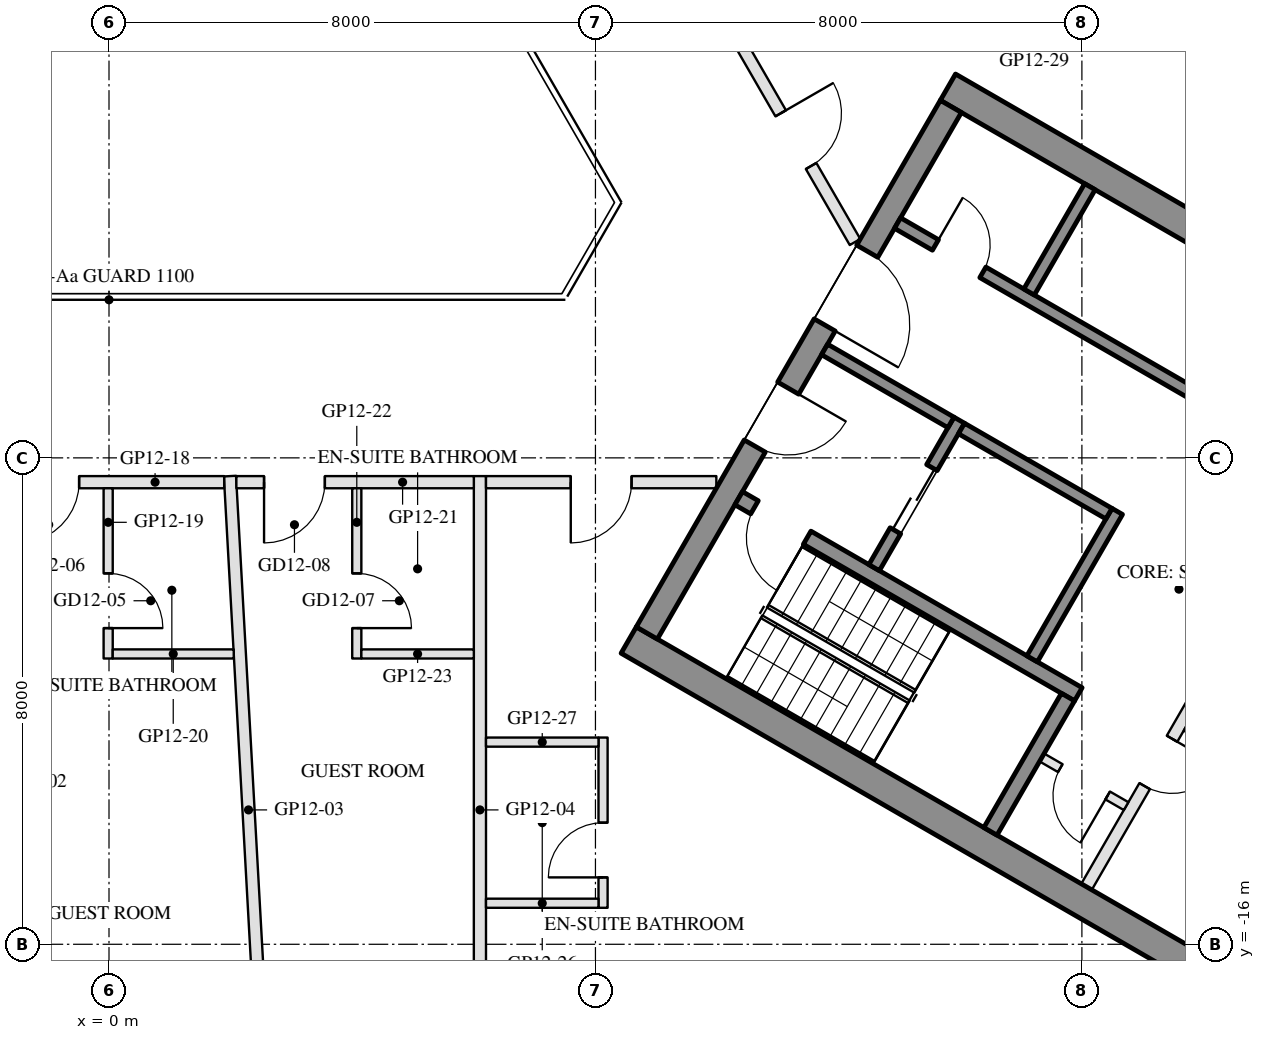
"""IFC4 building model, lengths in metres.
Left out: names, types, materials, properties, quantities, classifications, styles, units other than length and angle.
Written with IfcOpenShell. Run it as: python <this file> out.ifc"""

import sys

from ifc_helpers import new_model, si_unit, direction, frame, frame_2d, origin, place, context, subcontext, project, spatial, rectangle, extrude, element, fill, save


model = new_model("IFC4")
c1 = context("Model", 3, precision=1e-05, world=origin(), true_north=direction((0.0, 1.0)))
c2 = subcontext(c1, "Body", "Model", "MODEL_VIEW")
j1 = project(units=[si_unit("LENGTHUNIT", "METRE"), si_unit("PLANEANGLEUNIT", "RADIAN")], contexts=[c1])
p1 = place(None, origin())
s1 = spatial("IfcSite", under=j1, at=p1, CompositionType="ELEMENT")
p2 = place(p1, origin())
s2 = spatial("IfcBuilding", under=s1, at=p2, CompositionType="ELEMENT")
p3 = place(p2, frame((0.0, 0.0, 146.6)))
s3 = spatial("IfcBuildingStorey", under=s2, at=p3, CompositionType="ELEMENT", Elevation=146.6)
for number, where, z_axis, x_axis in (
    (1, (8.547, -10.997, 0.0), (0.0, 0.0, 1.0), (0.866, -0.5, 0.0)),
    (2, (13.797, -1.903, 0.0), (0.0, 0.0, 1.0), (0.866, -0.5, 0.0)),
):
    element("IfcWall", number, at=place(p3, frame(where, z_axis=z_axis, x_axis=x_axis)), inside=s3, PredefinedType="SHEAR", context=c2, shape_type="SweptSolid", body=[
        extrude(rectangle(XDim=14.837, YDim=0.5, at=frame_2d((7.418, 0.0))), origin(), (0.0, 0.0, 1.0), 3.5),
    ])
p4 = place(p3, frame((8.845, -10.88, 0.0), z_axis=(0.0, 0.0, 1.0), x_axis=(0.500004234368, 0.866022959057, 0.0)))
e3 = element("IfcWall", 3, at=p4, inside=s3, PredefinedType="SHEAR", context=c2, shape_type="SweptSolid", body=[
    extrude(rectangle(XDim=10.0, YDim=0.4, at=frame_2d((5.0, 0.0))), origin(), (0.0, 0.0, 1.0), 3.5),
])
p5 = place(p4, frame((3.55, 0.0, 0.0)))
e4 = element("IfcOpeningElement", 4, at=p5, cuts=e3, PredefinedType="OPENING", context=c2, shape_type="SweptSolid", body=[
    extrude(rectangle(XDim=1.1, YDim=2.1, at=frame_2d((0.55, 1.05))), frame((0.0, 0.21, 0.0), z_axis=(0.0, -1.0, 0.0), x_axis=(1.0, 0.0, 0.0)), (0.0, 0.0, 1.0), 0.42),
])
p6 = place(p4, frame((5.85, 0.0, 0.0)))
e5 = element("IfcOpeningElement", 5, at=p6, cuts=e3, PredefinedType="OPENING", context=c2, shape_type="SweptSolid", body=[
    extrude(rectangle(XDim=1.4, YDim=2.1, at=frame_2d((0.7, 1.05))), frame((0.0, 0.21, 0.0), z_axis=(0.0, -1.0, 0.0), x_axis=(1.0, 0.0, 0.0)), (0.0, 0.0, 1.0), 0.42),
])
p7 = place(p3, frame((10.356, -8.664, 0.0), z_axis=(0.0, 0.0, 1.0), x_axis=(0.866028629588, -0.499994412703, 0.0)))
e6 = element("IfcWall", 6, at=p7, inside=s3, PredefinedType="SHEAR", context=c2, shape_type="SweptSolid", body=[
    extrude(rectangle(XDim=6.45, YDim=0.25, at=frame_2d((3.225, 0.0))), origin(), (0.0, 0.0, 1.0), 3.5),
])
p8 = place(p7, frame((0.3, 0.0, 0.0)))
e7 = element("IfcOpeningElement", 7, at=p8, cuts=e6, PredefinedType="OPENING", context=c2, shape_type="SweptSolid", body=[
    extrude(rectangle(XDim=1.0, YDim=2.1, at=frame_2d((0.5, 1.05))), frame((0.0, 0.135, 0.0), z_axis=(0.0, -1.0, 0.0), x_axis=(1.0, 0.0, 0.0)), (0.0, 0.0, 1.0), 0.27),
])
p9 = place(p3, frame((14.496, -14.143, 0.0), z_axis=(0.0, 0.0, 1.0), x_axis=(0.500062241894, 0.865989465428, 0.0)))
e8 = element("IfcWall", 8, at=p9, inside=s3, PredefinedType="SHEAR", context=c2, shape_type="SweptSolid", body=[
    extrude(rectangle(XDim=2.55, YDim=0.25, at=frame_2d((1.275, 0.0))), origin(), (0.0, 0.0, 1.0), 3.5),
])
p10 = place(p3, frame((15.181, -11.305, 0.0), z_axis=(0.0, 0.0, 1.0), x_axis=(0.49994636267, 0.866056369097, 0.0)))
e9 = element("IfcWall", 9, at=p10, inside=s3, PredefinedType="SHEAR", context=c2, shape_type="SweptSolid", body=[
    extrude(rectangle(XDim=2.8, YDim=0.2, at=frame_2d((1.4, 0.0))), origin(), (0.0, 0.0, 1.0), 3.5),
])
p11 = place(p3, frame((12.583, -9.805, 0.0), z_axis=(0.0, 0.0, 1.0), x_axis=(0.49994636267, 0.866056369097, 0.0)))
e10 = element("IfcWall", 10, at=p11, inside=s3, PredefinedType="SHEAR", context=c2, shape_type="SweptSolid", body=[
    extrude(rectangle(XDim=2.8, YDim=0.2, at=frame_2d((1.4, 0.0))), origin(), (0.0, 0.0, 1.0), 3.5),
])
p12 = place(p11, frame((0.7, 0.0, 0.0)))
e11 = element("IfcOpeningElement", 11, at=p12, cuts=e10, PredefinedType="OPENING", context=c2, shape_type="SweptSolid", body=[
    extrude(rectangle(XDim=1.2, YDim=2.1, at=frame_2d((0.6, 1.05))), frame((0.0, 0.11, 0.0), z_axis=(0.0, -1.0, 0.0), x_axis=(1.0, 0.0, 0.0)), (0.0, 0.0, 1.0), 0.22),
])
p13 = place(p3, frame((11.768, -6.217, 0.0), z_axis=(0.0, 0.0, 1.0), x_axis=(0.866050077142, -0.499957262057, 0.0)))
e12 = element("IfcWall", 12, at=p13, inside=s3, PredefinedType="SHEAR", context=c2, shape_type="SweptSolid", body=[
    extrude(rectangle(XDim=2.4, YDim=0.2, at=frame_2d((1.2, 0.0))), origin(), (0.0, 0.0, 1.0), 3.5),
])
p14 = place(p3, frame((14.02, -7.517, 0.0), z_axis=(0.0, 0.0, 1.0), x_axis=(0.866034573852, -0.49998411664, 0.0)))
e13 = element("IfcWall", 13, at=p14, inside=s3, PredefinedType="SHEAR", context=c2, shape_type="SweptSolid", body=[
    extrude(rectangle(XDim=2.8, YDim=0.2, at=frame_2d((1.4, 0.0))), origin(), (0.0, 0.0, 1.0), 3.5),
])
p15 = place(p3, frame((12.968, -4.138, 0.0), z_axis=(0.0, 0.0, 1.0), x_axis=(0.866028328073, -0.49999493495, 0.0)))
e14 = element("IfcWall", 14, at=p15, inside=s3, PredefinedType="SHEAR", context=c2, shape_type="SweptSolid", body=[
    extrude(rectangle(XDim=10.16, YDim=0.2, at=frame_2d((5.08, 0.0))), origin(), (0.0, 0.0, 1.0), 3.5),
])
p16 = place(p15, frame((0.72, 0.0, 0.0)))
e15 = element("IfcOpeningElement", 15, at=p16, cuts=e14, PredefinedType="OPENING", context=c2, shape_type="SweptSolid", body=[
    extrude(rectangle(XDim=0.9, YDim=2.1, at=frame_2d((0.45, 1.05))), frame((0.0, 0.11, 0.0), z_axis=(0.0, -1.0, 0.0), x_axis=(1.0, 0.0, 0.0)), (0.0, 0.0, 1.0), 0.22),
])
p17 = place(p15, frame((5.8, 0.0, 0.0)))
e16 = element("IfcOpeningElement", 16, at=p17, cuts=e14, PredefinedType="OPENING", context=c2, shape_type="SweptSolid", body=[
    extrude(rectangle(XDim=0.9, YDim=2.1, at=frame_2d((0.45, 1.05))), frame((0.0, 0.11, 0.0), z_axis=(0.0, -1.0, 0.0), x_axis=(1.0, 0.0, 0.0)), (0.0, 0.0, 1.0), 0.22),
])
p18 = place(p3, frame((15.131, -5.272, 0.0), z_axis=(0.0, 0.0, 1.0), x_axis=(0.499972520799, 0.866041268327, 0.0)))
e17 = element("IfcWall", 17, at=p18, inside=s3, PredefinedType="SHEAR", context=c2, shape_type="SweptSolid", body=[
    extrude(rectangle(XDim=2.0, YDim=0.2, at=frame_2d((1.0, 0.0))), origin(), (0.0, 0.0, 1.0), 3.5),
])
p19 = place(p3, frame((16.076, -15.055, 0.0), z_axis=(0.0, 0.0, 1.0), x_axis=(0.499995103361, 0.866028230842, 0.0)))
e18 = element("IfcWall", 18, at=p19, inside=s3, PredefinedType="PARTITIONING", context=c2, shape_type="SweptSolid", body=[
    extrude(rectangle(XDim=5.4, YDim=0.2, at=frame_2d((2.7, 0.0))), origin(), (0.0, 0.0, 1.0), 3.5),
])
p20 = place(p19, frame((1.913, 0.0, 0.0)))
e19 = element("IfcOpeningElement", 19, at=p20, cuts=e18, PredefinedType="OPENING", context=c2, shape_type="SweptSolid", body=[
    extrude(rectangle(XDim=0.9, YDim=2.1, at=frame_2d((0.45, 1.05))), frame((0.0, 0.11, 0.0), z_axis=(0.0, -1.0, 0.0), x_axis=(1.0, 0.0, 0.0)), (0.0, 0.0, 1.0), 0.22),
])
p21 = place(p19, frame((3.788, 0.0, 0.0)))
e20 = element("IfcOpeningElement", 20, at=p21, cuts=e18, PredefinedType="OPENING", context=c2, shape_type="SweptSolid", body=[
    extrude(rectangle(XDim=0.9, YDim=2.1, at=frame_2d((0.45, 1.05))), frame((0.0, 0.11, 0.0), z_axis=(0.0, -1.0, 0.0), x_axis=(1.0, 0.0, 0.0)), (0.0, 0.0, 1.0), 0.22),
])
p22 = place(p3, frame((15.342, -12.928, 0.0), z_axis=(0.0, 0.0, 1.0), x_axis=(0.865989903783, -0.500061482766, 0.0)))
e21 = element("IfcWall", 21, at=p22, inside=s3, PredefinedType="PARTITIONING", context=c2, shape_type="SweptSolid", body=[
    extrude(rectangle(XDim=1.6, YDim=0.15, at=frame_2d((0.8, 0.0))), origin(), (0.0, 0.0, 1.0), 3.5),
])
p23 = place(p22, frame((0.35, 0.0, 0.0)))
e22 = element("IfcOpeningElement", 22, at=p23, cuts=e21, PredefinedType="OPENING", context=c2, shape_type="SweptSolid", body=[
    extrude(rectangle(XDim=0.9, YDim=2.1, at=frame_2d((0.45, 1.05))), frame((0.0, 0.085, 0.0), z_axis=(0.0, -1.0, 0.0), x_axis=(1.0, 0.0, 0.0)), (0.0, 0.0, 1.0), 0.17),
])
p24 = place(p3, frame((17.713, -12.42, 0.0), z_axis=(0.0, 0.0, 1.0), x_axis=(0.866016523273, -0.500015381182, 0.0)))
e23 = element("IfcWall", 23, at=p24, inside=s3, PredefinedType="PARTITIONING", context=c2, shape_type="SweptSolid", body=[
    extrude(rectangle(XDim=6.95, YDim=0.15, at=frame_2d((3.475, 0.0))), origin(), (0.0, 0.0, 1.0), 3.5),
])
p25 = place(p3, frame((2.6, -19.28, 0.0), z_axis=(0.0, 0.0, 1.0), x_axis=(-0.055568385591, 0.998454883569, 0.0)))
e24 = element("IfcWall", 24, at=p25, inside=s3, PredefinedType="PARTITIONING", context=c2, shape_type="SweptSolid", body=[
    extrude(rectangle(XDim=10.997, YDim=0.2, at=frame_2d((5.499, 0.0))), origin(), (0.0, 0.0, 1.0), 3.06),
])
p26 = place(p3, frame((6.1, -19.28, 0.0), z_axis=(0.0, 0.0, 1.0), x_axis=(0.0, 1.0, 0.0)))
e25 = element("IfcWall", 25, at=p26, inside=s3, PredefinedType="PARTITIONING", context=c2, shape_type="SweptSolid", body=[
    extrude(rectangle(XDim=10.98, YDim=0.2, at=frame_2d((5.49, 0.0))), origin(), (0.0, 0.0, 1.0), 3.06),
])
p27 = place(p3, frame((1.894, -8.4, 0.0), z_axis=(0.0, 0.0, 1.0), x_axis=(-1.0, 0.0, 0.0)))
e26 = element("IfcWall", 26, at=p27, inside=s3, PredefinedType="PARTITIONING", context=c2, shape_type="SweptSolid", body=[
    extrude(rectangle(XDim=3.789, YDim=0.2, at=frame_2d((1.894, 0.0))), origin(), (0.0, 0.0, 1.0), 2.95),
])
p28 = place(p27, frame((2.386, 0.0, 0.0)))
e27 = element("IfcOpeningElement", 27, at=p28, cuts=e26, PredefinedType="OPENING", context=c2, shape_type="SweptSolid", body=[
    extrude(rectangle(XDim=1.0, YDim=2.1, at=frame_2d((0.5, 1.05))), frame((0.0, 0.11, 0.0), z_axis=(0.0, -1.0, 0.0), x_axis=(1.0, 0.0, 0.0)), (0.0, 0.0, 1.0), 0.22),
])
p29 = place(p3, frame((-0.014, -8.5, 0.0), z_axis=(0.0, 0.0, 1.0), x_axis=(0.0, -1.0, 0.0)))
e28 = element("IfcWall", 28, at=p29, inside=s3, PredefinedType="PARTITIONING", context=c2, shape_type="SweptSolid", body=[
    extrude(rectangle(XDim=2.8, YDim=0.15, at=frame_2d((1.4, 0.0))), origin(), (0.0, 0.0, 1.0), 2.95),
])
p30 = place(p29, frame((1.4, 0.0, 0.0)))
e29 = element("IfcOpeningElement", 29, at=p30, cuts=e28, PredefinedType="OPENING", context=c2, shape_type="SweptSolid", body=[
    extrude(rectangle(XDim=0.9, YDim=2.1, at=frame_2d((0.45, 1.05))), frame((0.0, 0.085, 0.0), z_axis=(0.0, -1.0, 0.0), x_axis=(1.0, 0.0, 0.0)), (0.0, 0.0, 1.0), 0.17),
])
p31 = place(p3, frame((0.061, -11.225, 0.0), z_axis=(0.0, 0.0, 1.0), x_axis=(1.0, 0.0, 0.0)))
e30 = element("IfcWall", 30, at=p31, inside=s3, PredefinedType="PARTITIONING", context=c2, shape_type="SweptSolid", body=[
    extrude(rectangle(XDim=1.99, YDim=0.15, at=frame_2d((0.995, 0.0))), origin(), (0.0, 0.0, 1.0), 2.95),
])
p32 = place(p3, frame((6.0, -8.4, 0.0), z_axis=(0.0, 0.0, 1.0), x_axis=(-1.0, 0.0, 0.0)))
e31 = element("IfcWall", 31, at=p32, inside=s3, PredefinedType="PARTITIONING", context=c2, shape_type="SweptSolid", body=[
    extrude(rectangle(XDim=3.906, YDim=0.2, at=frame_2d((1.953, 0.0))), origin(), (0.0, 0.0, 1.0), 2.95),
])
p33 = place(p32, frame((2.45, 0.0, 0.0)))
e32 = element("IfcOpeningElement", 32, at=p33, cuts=e31, PredefinedType="OPENING", context=c2, shape_type="SweptSolid", body=[
    extrude(rectangle(XDim=1.0, YDim=2.1, at=frame_2d((0.5, 1.05))), frame((0.0, 0.11, 0.0), z_axis=(0.0, -1.0, 0.0), x_axis=(1.0, 0.0, 0.0)), (0.0, 0.0, 1.0), 0.22),
])
p34 = place(p3, frame((4.075, -8.5, 0.0), z_axis=(0.0, 0.0, 1.0), x_axis=(0.0, -1.0, 0.0)))
e33 = element("IfcWall", 33, at=p34, inside=s3, PredefinedType="PARTITIONING", context=c2, shape_type="SweptSolid", body=[
    extrude(rectangle(XDim=2.8, YDim=0.15, at=frame_2d((1.4, 0.0))), origin(), (0.0, 0.0, 1.0), 2.95),
])
p35 = place(p34, frame((1.4, 0.0, 0.0)))
e34 = element("IfcOpeningElement", 34, at=p35, cuts=e33, PredefinedType="OPENING", context=c2, shape_type="SweptSolid", body=[
    extrude(rectangle(XDim=0.9, YDim=2.1, at=frame_2d((0.45, 1.05))), frame((0.0, 0.085, 0.0), z_axis=(0.0, -1.0, 0.0), x_axis=(1.0, 0.0, 0.0)), (0.0, 0.0, 1.0), 0.17),
])
p36 = place(p3, frame((4.15, -11.225, 0.0), z_axis=(0.0, 0.0, 1.0), x_axis=(1.0, 0.0, 0.0)))
e35 = element("IfcWall", 35, at=p36, inside=s3, PredefinedType="PARTITIONING", context=c2, shape_type="SweptSolid", body=[
    extrude(rectangle(XDim=1.85, YDim=0.15, at=frame_2d((0.925, 0.0))), origin(), (0.0, 0.0, 1.0), 3.55),
])
p37 = place(p3, frame((9.988, -8.4, 0.0), z_axis=(0.0, 0.0, 1.0), x_axis=(-1.0, 0.0, 0.0)))
e36 = element("IfcWall", 36, at=p37, inside=s3, PredefinedType="PARTITIONING", context=c2, shape_type="SweptSolid", body=[
    extrude(rectangle(XDim=3.788, YDim=0.2, at=frame_2d((1.894, 0.0))), origin(), (0.0, 0.0, 1.0), 2.95),
])
p38 = place(p37, frame((1.394, 0.0, 0.0)))
e37 = element("IfcOpeningElement", 37, at=p38, cuts=e36, PredefinedType="OPENING", context=c2, shape_type="SweptSolid", body=[
    extrude(rectangle(XDim=1.0, YDim=2.1, at=frame_2d((0.5, 1.05))), frame((0.0, 0.11, 0.0), z_axis=(0.0, -1.0, 0.0), x_axis=(1.0, 0.0, 0.0)), (0.0, 0.0, 1.0), 0.22),
])
p39 = place(p3, frame((8.125, -15.4, 0.0), z_axis=(0.0, 0.0, 1.0), x_axis=(0.0, 1.0, 0.0)))
e38 = element("IfcWall", 38, at=p39, inside=s3, PredefinedType="PARTITIONING", context=c2, shape_type="SweptSolid", body=[
    extrude(rectangle(XDim=2.8, YDim=0.15, at=frame_2d((1.4, 0.0))), origin(), (0.0, 0.0, 1.0), 3.55),
])
p40 = place(p39, frame((0.5, 0.0, 0.0)))
e39 = element("IfcOpeningElement", 39, at=p40, cuts=e38, PredefinedType="OPENING", context=c2, shape_type="SweptSolid", body=[
    extrude(rectangle(XDim=0.9, YDim=2.1, at=frame_2d((0.45, 1.05))), frame((0.0, 0.085, 0.0), z_axis=(0.0, -1.0, 0.0), x_axis=(1.0, 0.0, 0.0)), (0.0, 0.0, 1.0), 0.17),
])
for number, where, z_axis, x_axis in (
    (40, (6.2, -15.325, 0.0), (0.0, 0.0, 1.0), (1.0, 0.0, 0.0)),
    (41, (6.2, -12.675, 0.0), (0.0, 0.0, 1.0), (1.0, 0.0, 0.0)),
):
    element("IfcWall", number, at=place(p3, frame(where, z_axis=z_axis, x_axis=x_axis)), inside=s3, PredefinedType="PARTITIONING", context=c2, shape_type="SweptSolid", body=[
        extrude(rectangle(XDim=1.85, YDim=0.15, at=frame_2d((0.925, 0.0))), origin(), (0.0, 0.0, 1.0), 2.95),
    ])
p41 = place(p3, frame((10.325, -1.083, 0.0), z_axis=(0.0, 0.0, 1.0), x_axis=(0.500008716408, -0.866020371305, 0.0)))
e42 = element("IfcWall", 42, at=p41, inside=s3, PredefinedType="PARTITIONING", context=c2, shape_type="SweptSolid", body=[
    extrude(rectangle(XDim=3.888, YDim=0.2, at=frame_2d((1.944, 0.0))), origin(), (0.0, 0.0, 1.0), 2.95),
])
p42 = place(p41, frame((1.444, 0.0, 0.0)))
e43 = element("IfcOpeningElement", 43, at=p42, cuts=e42, PredefinedType="OPENING", context=c2, shape_type="SweptSolid", body=[
    extrude(rectangle(XDim=1.0, YDim=2.1, at=frame_2d((0.5, 1.05))), frame((0.0, 0.11, 0.0), z_axis=(0.0, -1.0, 0.0), x_axis=(1.0, 0.0, 0.0)), (0.0, 0.0, 1.0), 0.22),
])
p43 = place(p12, origin())
e44 = element("IfcDoor", 44, at=p43, inside=s3, OperationType="DOUBLE_DOOR_SLIDING", PredefinedType="DOOR", context=c2, shape_type="SweptSolid", body=[
    extrude(rectangle(XDim=1.2, YDim=2.1, at=frame_2d((0.6, 1.05))), frame((0.0, 0.025, 0.0), z_axis=(0.0, -1.0, 0.0), x_axis=(1.0, 0.0, 0.0)), (0.0, 0.0, 1.0), 0.05),
])
fill(e11, e44)
p44 = place(p23, frame((0.9, 0.0, 0.0), z_axis=(0.0, 0.0, 1.0), x_axis=(-1.0, 0.0, 0.0)))
e45 = element("IfcDoor", 45, at=p44, inside=s3, OperationType="SINGLE_SWING_LEFT", PredefinedType="DOOR", context=c2, shape_type="SweptSolid", body=[
    extrude(rectangle(XDim=0.9, YDim=2.1, at=frame_2d((0.45, 1.05))), frame((0.0, 0.025, 0.0), z_axis=(0.0, -1.0, 0.0), x_axis=(1.0, 0.0, 0.0)), (0.0, 0.0, 1.0), 0.05),
])
fill(e22, e45)
p45 = place(p16, origin())
e46 = element("IfcDoor", 46, at=p45, inside=s3, OperationType="SINGLE_SWING_LEFT", PredefinedType="DOOR", context=c2, shape_type="SweptSolid", body=[
    extrude(rectangle(XDim=0.9, YDim=2.1, at=frame_2d((0.45, 1.05))), frame((0.0, 0.025, 0.0), z_axis=(0.0, -1.0, 0.0), x_axis=(1.0, 0.0, 0.0)), (0.0, 0.0, 1.0), 0.05),
])
fill(e15, e46)
p46 = place(p20, frame((0.9, 0.0, 0.0), z_axis=(0.0, 0.0, 1.0), x_axis=(-1.0, 0.0, 0.0)))
e47 = element("IfcDoor", 47, at=p46, inside=s3, OperationType="SINGLE_SWING_LEFT", PredefinedType="DOOR", context=c2, shape_type="SweptSolid", body=[
    extrude(rectangle(XDim=0.9, YDim=2.1, at=frame_2d((0.45, 1.05))), frame((0.0, 0.025, 0.0), z_axis=(0.0, -1.0, 0.0), x_axis=(1.0, 0.0, 0.0)), (0.0, 0.0, 1.0), 0.05),
])
fill(e19, e47)
p47 = place(p5, frame((1.1, 0.0, 0.0), z_axis=(0.0, 0.0, 1.0), x_axis=(-1.0, 0.0, 0.0)))
e48 = element("IfcDoor", 48, at=p47, inside=s3, OperationType="SINGLE_SWING_LEFT", PredefinedType="DOOR", context=c2, shape_type="SweptSolid", body=[
    extrude(rectangle(XDim=1.1, YDim=2.1, at=frame_2d((0.55, 1.05))), frame((0.0, 0.025, 0.0), z_axis=(0.0, -1.0, 0.0), x_axis=(1.0, 0.0, 0.0)), (0.0, 0.0, 1.0), 0.05),
])
fill(e4, e48)
p48 = place(p6, frame((1.4, 0.0, 0.0), z_axis=(0.0, 0.0, 1.0), x_axis=(-1.0, 0.0, 0.0)))
e49 = element("IfcDoor", 49, at=p48, inside=s3, OperationType="DOUBLE_DOOR_SINGLE_SWING", PredefinedType="DOOR", context=c2, shape_type="SweptSolid", body=[
    extrude(rectangle(XDim=1.4, YDim=2.1, at=frame_2d((0.7, 1.05))), frame((0.0, 0.025, 0.0), z_axis=(0.0, -1.0, 0.0), x_axis=(1.0, 0.0, 0.0)), (0.0, 0.0, 1.0), 0.05),
])
fill(e5, e49)
p49 = place(p8, frame((1.0, 0.0, 0.0), z_axis=(0.0, 0.0, 1.0), x_axis=(-1.0, 0.0, 0.0)))
e50 = element("IfcDoor", 50, at=p49, inside=s3, OperationType="SINGLE_SWING_LEFT", PredefinedType="DOOR", context=c2, shape_type="SweptSolid", body=[
    extrude(rectangle(XDim=1.0, YDim=2.1, at=frame_2d((0.5, 1.05))), frame((0.0, 0.025, 0.0), z_axis=(0.0, -1.0, 0.0), x_axis=(1.0, 0.0, 0.0)), (0.0, 0.0, 1.0), 0.05),
])
fill(e7, e50)
p50 = place(p30, origin())
e51 = element("IfcDoor", 51, at=p50, inside=s3, OperationType="SINGLE_SWING_RIGHT", PredefinedType="DOOR", context=c2, shape_type="SweptSolid", body=[
    extrude(rectangle(XDim=0.9, YDim=2.1, at=frame_2d((0.45, 1.05))), frame((0.0, 0.025, 0.0), z_axis=(0.0, -1.0, 0.0), x_axis=(1.0, 0.0, 0.0)), (0.0, 0.0, 1.0), 0.05),
])
fill(e29, e51)
p51 = place(p28, origin())
e52 = element("IfcDoor", 52, at=p51, inside=s3, OperationType="SINGLE_SWING_RIGHT", PredefinedType="DOOR", context=c2, shape_type="SweptSolid", body=[
    extrude(rectangle(XDim=1.0, YDim=2.1, at=frame_2d((0.5, 1.05))), frame((0.0, 0.025, 0.0), z_axis=(0.0, -1.0, 0.0), x_axis=(1.0, 0.0, 0.0)), (0.0, 0.0, 1.0), 0.05),
])
fill(e27, e52)
p52 = place(p35, origin())
e53 = element("IfcDoor", 53, at=p52, inside=s3, OperationType="SINGLE_SWING_RIGHT", PredefinedType="DOOR", context=c2, shape_type="SweptSolid", body=[
    extrude(rectangle(XDim=0.9, YDim=2.1, at=frame_2d((0.45, 1.05))), frame((0.0, 0.025, 0.0), z_axis=(0.0, -1.0, 0.0), x_axis=(1.0, 0.0, 0.0)), (0.0, 0.0, 1.0), 0.05),
])
fill(e34, e53)
p53 = place(p33, origin())
e54 = element("IfcDoor", 54, at=p53, inside=s3, OperationType="SINGLE_SWING_RIGHT", PredefinedType="DOOR", context=c2, shape_type="SweptSolid", body=[
    extrude(rectangle(XDim=1.0, YDim=2.1, at=frame_2d((0.5, 1.05))), frame((0.0, 0.025, 0.0), z_axis=(0.0, -1.0, 0.0), x_axis=(1.0, 0.0, 0.0)), (0.0, 0.0, 1.0), 0.05),
])
fill(e32, e54)
p54 = place(p40, origin())
e55 = element("IfcDoor", 55, at=p54, inside=s3, OperationType="SINGLE_SWING_LEFT", PredefinedType="DOOR", context=c2, shape_type="SweptSolid", body=[
    extrude(rectangle(XDim=0.9, YDim=2.1, at=frame_2d((0.45, 1.05))), frame((0.0, 0.025, 0.0), z_axis=(0.0, -1.0, 0.0), x_axis=(1.0, 0.0, 0.0)), (0.0, 0.0, 1.0), 0.05),
])
fill(e39, e55)
p55 = place(p38, origin())
e56 = element("IfcDoor", 56, at=p55, inside=s3, OperationType="SINGLE_SWING_RIGHT", PredefinedType="DOOR", context=c2, shape_type="SweptSolid", body=[
    extrude(rectangle(XDim=1.0, YDim=2.1, at=frame_2d((0.5, 1.05))), frame((0.0, 0.025, 0.0), z_axis=(0.0, -1.0, 0.0), x_axis=(1.0, 0.0, 0.0)), (0.0, 0.0, 1.0), 0.05),
])
fill(e37, e56)
p56 = place(p42, origin())
e57 = element("IfcDoor", 57, at=p56, inside=s3, OperationType="SINGLE_SWING_LEFT", PredefinedType="DOOR", context=c2, shape_type="SweptSolid", body=[
    extrude(rectangle(XDim=1.0, YDim=2.1, at=frame_2d((0.5, 1.05))), frame((0.0, 0.025, 0.0), z_axis=(0.0, -1.0, 0.0), x_axis=(1.0, 0.0, 0.0)), (0.0, 0.0, 1.0), 0.05),
])
fill(e43, e57)
save(model, sys.argv[1])
